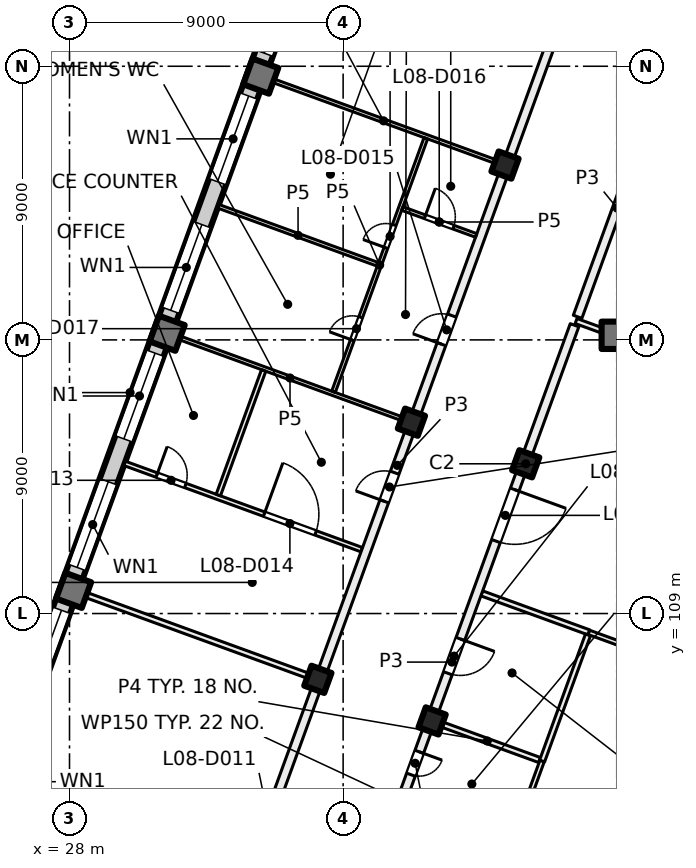
"""IFC4 building model, lengths in metres.
Left out: names, types, materials, properties, quantities, classifications, styles, units other than length and angle.
Written with IfcOpenShell. Run it as: python <this file> out.ifc"""

import sys

from ifc_helpers import new_model, si_unit, direction, frame, frame_2d, origin, origin_2d, place, context, subcontext, project, spatial, rectangle, extrude, element, fill, save


model = new_model("IFC4")
c1 = context("Model", 3, precision=1e-05, world=origin(), true_north=direction((0.0, 1.0)))
c2 = subcontext(c1, "Body", "Model", "MODEL_VIEW")
j1 = project(units=[si_unit("LENGTHUNIT", "METRE"), si_unit("PLANEANGLEUNIT", "RADIAN")], contexts=[c1])
p1 = place(None, origin())
s1 = spatial("IfcSite", under=j1, at=p1, CompositionType="ELEMENT")
p2 = place(p1, origin())
s2 = spatial("IfcBuilding", under=s1, at=p2, CompositionType="ELEMENT")
p3 = place(p2, frame((0.0, 0.0, 39.5)))
s3 = spatial("IfcBuildingStorey", under=s2, at=p3, CompositionType="ELEMENT", Elevation=39.5)
p4 = place(p3, frame((45.952, 118.152, 0.0), z_axis=(0.0, 0.0, 1.0), x_axis=(1.0, 0.0, 0.0)))
e1 = element("IfcColumn", 1, at=p4, inside=s3, PredefinedType="COLUMN", context=c2, shape_type="SweptSolid", body=[
    extrude(rectangle(XDim=0.9, YDim=0.9, at=origin_2d()), origin(), (0.0, 0.0, 1.0), 4.0),
])
for number, where, z_axis, x_axis in (
    (2, (43.006, 113.925, 0.0), (0.0, 0.0, 1.0), (-0.342, -0.94, 0.0)),
    (3, (39.927, 105.468, 0.0), (0.0, 0.0, 1.0), (-0.342, -0.94, 0.0)),
    (4, (42.325, 123.751, 0.0), (0.0, 0.0, 1.0), (-0.342, -0.94, 0.0)),
    (5, (39.247, 115.293, 0.0), (0.0, 0.0, 1.0), (-0.342, -0.94, 0.0)),
    (6, (36.169, 106.836, 0.0), (0.0, 0.0, 1.0), (-0.342, -0.94, 0.0)),
):
    element("IfcColumn", number, at=place(p3, frame(where, z_axis=z_axis, x_axis=x_axis)), inside=s3, PredefinedType="COLUMN", context=c2, shape_type="SweptSolid", body=[
        extrude(rectangle(XDim=0.7, YDim=0.7, at=origin_2d()), origin(), (0.0, 0.0, 1.0), 4.0),
    ])
for number, where, z_axis, x_axis in (
    (7, (34.291, 126.675, 0.0), (0.0, 0.0, 1.0), (-0.342, -0.94, 0.0)),
    (8, (31.212, 118.218, 0.0), (0.0, 0.0, 1.0), (-0.342, -0.94, 0.0)),
    (9, (28.134, 109.76, 0.0), (0.0, 0.0, 1.0), (-0.342, -0.94, 0.0)),
):
    element("IfcColumn", number, at=place(p3, frame(where, z_axis=z_axis, x_axis=x_axis)), inside=s3, PredefinedType="COLUMN", context=c2, shape_type="SweptSolid", body=[
        extrude(rectangle(XDim=0.9, YDim=0.9, at=origin_2d()), origin(), (0.0, 0.0, 1.0), 4.0),
    ])
p5 = place(p3, frame((52.212, 113.783, 0.0), z_axis=(0.0, 0.0, 1.0), x_axis=(-0.34202521188, -0.939690775968, 0.0)))
e10 = element("IfcWall", 10, at=p5, inside=s3, PredefinedType="SOLIDWALL", context=c2, shape_type="SweptSolid", body=[
    extrude(rectangle(XDim=21.745, YDim=0.6, at=frame_2d((10.873, 0.0))), origin(), (0.0, 0.0, 1.0), 3.625),
])
p6 = place(p5, frame((3.765, 0.0, 0.9)))
e11 = element("IfcOpeningElement", 11, at=p6, cuts=e10, PredefinedType="OPENING", context=c2, shape_type="SweptSolid", body=[
    extrude(rectangle(XDim=3.0, YDim=2.4, at=frame_2d((1.5, 1.2))), frame((0.0, 0.31, 0.0), z_axis=(0.0, -1.0, 0.0), x_axis=(1.0, 0.0, 0.0)), (0.0, 0.0, 1.0), 0.62),
])
p7 = place(p5, frame((8.265, 0.0, 0.9)))
e12 = element("IfcOpeningElement", 12, at=p7, cuts=e10, PredefinedType="OPENING", context=c2, shape_type="SweptSolid", body=[
    extrude(rectangle(XDim=3.0, YDim=2.4, at=frame_2d((1.5, 1.2))), frame((0.0, 0.31, 0.0), z_axis=(0.0, -1.0, 0.0), x_axis=(1.0, 0.0, 0.0)), (0.0, 0.0, 1.0), 0.62),
])
p8 = place(p5, frame((12.765, 0.0, 0.9)))
e13 = element("IfcOpeningElement", 13, at=p8, cuts=e10, PredefinedType="OPENING", context=c2, shape_type="SweptSolid", body=[
    extrude(rectangle(XDim=3.0, YDim=2.4, at=frame_2d((1.5, 1.2))), frame((0.0, 0.31, 0.0), z_axis=(0.0, -1.0, 0.0), x_axis=(1.0, 0.0, 0.0)), (0.0, 0.0, 1.0), 0.62),
])
p9 = place(p5, frame((17.265, 0.0, 0.9)))
e14 = element("IfcOpeningElement", 14, at=p9, cuts=e10, PredefinedType="OPENING", context=c2, shape_type="SweptSolid", body=[
    extrude(rectangle(XDim=3.0, YDim=2.4, at=frame_2d((1.5, 1.2))), frame((0.0, 0.31, 0.0), z_axis=(0.0, -1.0, 0.0), x_axis=(1.0, 0.0, 0.0)), (0.0, 0.0, 1.0), 0.62),
])
p10 = place(p3, frame((24.666, 100.669, 0.0), z_axis=(0.0, 0.0, 1.0), x_axis=(0.34201964167, 0.939692803373, 0.0)))
e15 = element("IfcWall", 15, at=p10, inside=s3, PredefinedType="SOLIDWALL", context=c2, shape_type="SweptSolid", body=[
    extrude(rectangle(XDim=32.884, YDim=0.6, at=frame_2d((16.442, 0.0))), origin(), (0.0, 0.0, 1.0), 3.625),
])
p11 = place(p10, frame((1.48, 0.0, 0.9)))
e16 = element("IfcOpeningElement", 16, at=p11, cuts=e15, PredefinedType="OPENING", context=c2, shape_type="SweptSolid", body=[
    extrude(rectangle(XDim=3.0, YDim=2.4, at=frame_2d((1.5, 1.2))), frame((0.0, 0.31, 0.0), z_axis=(0.0, -1.0, 0.0), x_axis=(1.0, 0.0, 0.0)), (0.0, 0.0, 1.0), 0.62),
])
p12 = place(p10, frame((5.98, 0.0, 0.9)))
e17 = element("IfcOpeningElement", 17, at=p12, cuts=e15, PredefinedType="OPENING", context=c2, shape_type="SweptSolid", body=[
    extrude(rectangle(XDim=3.0, YDim=2.4, at=frame_2d((1.5, 1.2))), frame((0.0, 0.31, 0.0), z_axis=(0.0, -1.0, 0.0), x_axis=(1.0, 0.0, 0.0)), (0.0, 0.0, 1.0), 0.62),
])
p13 = place(p10, frame((10.48, 0.0, 0.9)))
e18 = element("IfcOpeningElement", 18, at=p13, cuts=e15, PredefinedType="OPENING", context=c2, shape_type="SweptSolid", body=[
    extrude(rectangle(XDim=3.0, YDim=2.4, at=frame_2d((1.5, 1.2))), frame((0.0, 0.31, 0.0), z_axis=(0.0, -1.0, 0.0), x_axis=(1.0, 0.0, 0.0)), (0.0, 0.0, 1.0), 0.62),
])
p14 = place(p10, frame((14.98, 0.0, 0.9)))
e19 = element("IfcOpeningElement", 19, at=p14, cuts=e15, PredefinedType="OPENING", context=c2, shape_type="SweptSolid", body=[
    extrude(rectangle(XDim=3.0, YDim=2.4, at=frame_2d((1.5, 1.2))), frame((0.0, 0.31, 0.0), z_axis=(0.0, -1.0, 0.0), x_axis=(1.0, 0.0, 0.0)), (0.0, 0.0, 1.0), 0.62),
])
p15 = place(p10, frame((19.48, 0.0, 0.9)))
e20 = element("IfcOpeningElement", 20, at=p15, cuts=e15, PredefinedType="OPENING", context=c2, shape_type="SweptSolid", body=[
    extrude(rectangle(XDim=3.0, YDim=2.4, at=frame_2d((1.5, 1.2))), frame((0.0, 0.31, 0.0), z_axis=(0.0, -1.0, 0.0), x_axis=(1.0, 0.0, 0.0)), (0.0, 0.0, 1.0), 0.62),
])
p16 = place(p10, frame((23.98, 0.0, 0.9)))
e21 = element("IfcOpeningElement", 21, at=p16, cuts=e15, PredefinedType="OPENING", context=c2, shape_type="SweptSolid", body=[
    extrude(rectangle(XDim=3.0, YDim=2.4, at=frame_2d((1.5, 1.2))), frame((0.0, 0.31, 0.0), z_axis=(0.0, -1.0, 0.0), x_axis=(1.0, 0.0, 0.0)), (0.0, 0.0, 1.0), 0.62),
])
p17 = place(p10, frame((28.48, 0.0, 0.9)))
e22 = element("IfcOpeningElement", 22, at=p17, cuts=e15, PredefinedType="OPENING", context=c2, shape_type="SweptSolid", body=[
    extrude(rectangle(XDim=3.0, YDim=2.4, at=frame_2d((1.5, 1.2))), frame((0.0, 0.31, 0.0), z_axis=(0.0, -1.0, 0.0), x_axis=(1.0, 0.0, 0.0)), (0.0, 0.0, 1.0), 0.62),
])
p18 = place(p3, frame((28.275, 109.709, 0.0), z_axis=(0.0, 0.0, 1.0), x_axis=(0.939697205528, -0.342007546586, 0.0)))
e23 = element("IfcWall", 23, at=p18, inside=s3, PredefinedType="PARTITIONING", context=c2, shape_type="SweptSolid", body=[
    extrude(rectangle(XDim=8.301, YDim=0.175, at=frame_2d((4.15, 0.0))), origin(), (0.0, 0.0, 1.0), 3.625),
])
p19 = place(p3, frame((29.814, 113.938, 0.0), z_axis=(0.0, 0.0, 1.0), x_axis=(0.939697205528, -0.342007546586, 0.0)))
e24 = element("IfcWall", 24, at=p19, inside=s3, PredefinedType="PARTITIONING", context=c2, shape_type="SweptSolid", body=[
    extrude(rectangle(XDim=8.301, YDim=0.15, at=frame_2d((4.15, 0.0))), origin(), (0.0, 0.0, 1.0), 3.625),
])
p20 = place(p19, frame((1.125, 0.0, 0.0)))
e25 = element("IfcOpeningElement", 25, at=p20, cuts=e24, PredefinedType="OPENING", context=c2, shape_type="SweptSolid", body=[
    extrude(rectangle(XDim=1.0, YDim=2.1, at=frame_2d((0.5, 1.05))), frame((0.0, 0.085, 0.0), z_axis=(0.0, -1.0, 0.0), x_axis=(1.0, 0.0, 0.0)), (0.0, 0.0, 1.0), 0.17),
])
p21 = place(p19, frame((4.884, 0.0, 0.0)))
e26 = element("IfcOpeningElement", 26, at=p21, cuts=e24, PredefinedType="OPENING", context=c2, shape_type="SweptSolid", body=[
    extrude(rectangle(XDim=1.8, YDim=2.1, at=frame_2d((0.9, 1.05))), frame((0.0, 0.085, 0.0), z_axis=(0.0, -1.0, 0.0), x_axis=(1.0, 0.0, 0.0)), (0.0, 0.0, 1.0), 0.17),
])
p22 = place(p3, frame((31.353, 118.166, 0.0), z_axis=(0.0, 0.0, 1.0), x_axis=(0.939687752599, -0.342033518263, 0.0)))
e27 = element("IfcWall", 27, at=p22, inside=s3, PredefinedType="PARTITIONING", context=c2, shape_type="SweptSolid", body=[
    extrude(rectangle(XDim=8.301, YDim=0.125, at=frame_2d((4.15, 0.0))), origin(), (0.0, 0.0, 1.0), 3.625),
])
p23 = place(p3, frame((32.881, 97.657, 0.0), z_axis=(0.0, 0.0, 1.0), x_axis=(0.342017360004, 0.939693633828, 0.0)))
e28 = element("IfcWall", 28, at=p23, inside=s3, PredefinedType="PARTITIONING", context=c2, shape_type="SweptSolid", body=[
    extrude(rectangle(XDim=34.516, YDim=0.3, at=frame_2d((17.258, 0.0))), origin(), (0.0, 0.0, 1.0), 3.625),
])
p24 = place(p23, frame((4.275, 0.0, 0.0)))
e29 = element("IfcOpeningElement", 29, at=p24, cuts=e28, PredefinedType="OPENING", context=c2, shape_type="SweptSolid", body=[
    extrude(rectangle(XDim=1.2, YDim=2.1, at=frame_2d((0.6, 1.05))), frame((0.0, 0.16, 0.0), z_axis=(0.0, -1.0, 0.0), x_axis=(1.0, 0.0, 0.0)), (0.0, 0.0, 1.0), 0.32),
])
p25 = place(p23, frame((16.0, 0.0, 0.0)))
e30 = element("IfcOpeningElement", 30, at=p25, cuts=e28, PredefinedType="OPENING", context=c2, shape_type="SweptSolid", body=[
    extrude(rectangle(XDim=1.0, YDim=2.1, at=frame_2d((0.5, 1.05))), frame((0.0, 0.16, 0.0), z_axis=(0.0, -1.0, 0.0), x_axis=(1.0, 0.0, 0.0)), (0.0, 0.0, 1.0), 0.32),
])
p26 = place(p23, frame((21.5, 0.0, 0.0)))
e31 = element("IfcOpeningElement", 31, at=p26, cuts=e28, PredefinedType="OPENING", context=c2, shape_type="SweptSolid", body=[
    extrude(rectangle(XDim=1.0, YDim=2.1, at=frame_2d((0.5, 1.05))), frame((0.0, 0.16, 0.0), z_axis=(0.0, -1.0, 0.0), x_axis=(1.0, 0.0, 0.0)), (0.0, 0.0, 1.0), 0.32),
])
p27 = place(p3, frame((34.386, 116.996, 0.0), z_axis=(0.0, 0.0, 1.0), x_axis=(-0.341945230853, -0.939719883315, 0.0)))
e32 = element("IfcWall", 32, at=p27, inside=s3, PredefinedType="PARTITIONING", context=c2, shape_type="SweptSolid", body=[
    extrude(rectangle(XDim=4.363, YDim=0.15, at=frame_2d((2.182, 0.0))), origin(), (0.0, 0.0, 1.0), 3.625),
])
p28 = place(p3, frame((34.431, 126.624, 0.0), z_axis=(0.0, 0.0, 1.0), x_axis=(0.939687752599, -0.342033518263, 0.0)))
e33 = element("IfcWall", 33, at=p28, inside=s3, PredefinedType="PARTITIONING", context=c2, shape_type="SweptSolid", body=[
    extrude(rectangle(XDim=8.301, YDim=0.125, at=frame_2d((4.15, 0.0))), origin(), (0.0, 0.0, 1.0), 3.625),
])
p29 = place(p3, frame((36.684, 116.293, 0.0), z_axis=(0.0, 0.0, 1.0), x_axis=(0.342089829483, 0.939667254173, 0.0)))
e34 = element("IfcWall", 34, at=p29, inside=s3, PredefinedType="PARTITIONING", context=c2, shape_type="SweptSolid", body=[
    extrude(rectangle(XDim=8.875, YDim=0.125, at=frame_2d((4.437, 0.0))), origin(), (0.0, 0.0, 1.0), 3.625),
])
p30 = place(p29, frame((1.809, 0.0, 0.0)))
e35 = element("IfcOpeningElement", 35, at=p30, cuts=e34, PredefinedType="OPENING", context=c2, shape_type="SweptSolid", body=[
    extrude(rectangle(XDim=0.8, YDim=2.1, at=frame_2d((0.4, 1.05))), frame((0.0, 0.073, 0.0), z_axis=(0.0, -1.0, 0.0), x_axis=(1.0, 0.0, 0.0)), (0.0, 0.0, 1.0), 0.145),
])
p31 = place(p29, frame((5.039, 0.0, 0.0)))
e36 = element("IfcOpeningElement", 36, at=p31, cuts=e34, PredefinedType="OPENING", context=c2, shape_type="SweptSolid", body=[
    extrude(rectangle(XDim=0.8, YDim=2.1, at=frame_2d((0.4, 1.05))), frame((0.0, 0.073, 0.0), z_axis=(0.0, -1.0, 0.0), x_axis=(1.0, 0.0, 0.0)), (0.0, 0.0, 1.0), 0.145),
])
p32 = place(p3, frame((38.143, 120.484, 0.0), z_axis=(0.0, 0.0, 1.0), x_axis=(-0.939696437289, 0.342009657388, 0.0)))
e37 = element("IfcWall", 37, at=p32, inside=s3, PredefinedType="PARTITIONING", context=c2, shape_type="SweptSolid", body=[
    extrude(rectangle(XDim=5.588, YDim=0.125, at=frame_2d((2.794, 0.0))), origin(), (0.0, 0.0, 1.0), 3.625),
])
p33 = place(p3, frame((41.561, 109.663, 0.0), z_axis=(0.0, 0.0, 1.0), x_axis=(0.939610777088, -0.34224492338, 0.0)))
e38 = element("IfcWall", 38, at=p33, inside=s3, PredefinedType="PARTITIONING", context=c2, shape_type="SweptSolid", body=[
    extrude(rectangle(XDim=3.749, YDim=0.175, at=frame_2d((1.875, 0.0))), origin(), (0.0, 0.0, 1.0), 3.625),
])
p34 = place(p3, frame((38.945, 122.321, 0.0), z_axis=(0.0, 0.0, 1.0), x_axis=(0.939542462288, -0.342432418966, 0.0)))
e39 = element("IfcWall", 39, at=p34, inside=s3, PredefinedType="PARTITIONING", context=c2, shape_type="SweptSolid", body=[
    extrude(rectangle(XDim=2.587, YDim=0.125, at=frame_2d((1.294, 0.0))), origin(), (0.0, 0.0, 1.0), 3.625),
])
p35 = place(p34, frame((0.794, 0.0, 0.0)))
e40 = element("IfcOpeningElement", 40, at=p35, cuts=e39, PredefinedType="OPENING", context=c2, shape_type="SweptSolid", body=[
    extrude(rectangle(XDim=1.0, YDim=2.1, at=frame_2d((0.5, 1.05))), frame((0.0, 0.073, 0.0), z_axis=(0.0, -1.0, 0.0), x_axis=(1.0, 0.0, 0.0)), (0.0, 0.0, 1.0), 0.145),
])
p36 = place(p3, frame((43.463, 104.181, 0.0), z_axis=(0.0, 0.0, 1.0), x_axis=(-0.939655178262, 0.342122998299, 0.0)))
e41 = element("IfcWall", 41, at=p36, inside=s3, PredefinedType="PARTITIONING", context=c2, shape_type="SweptSolid", body=[
    extrude(rectangle(XDim=3.663, YDim=0.175, at=frame_2d((1.832, 0.0))), origin(), (0.0, 0.0, 1.0), 3.625),
])
p37 = place(p3, frame((43.545, 104.151, 0.0), z_axis=(0.0, 0.0, 1.0), x_axis=(-0.341877092744, -0.93974467461, 0.0)))
e42 = element("IfcWall", 42, at=p37, inside=s3, PredefinedType="PARTITIONING", context=c2, shape_type="SweptSolid", body=[
    extrude(rectangle(XDim=2.925, YDim=0.15, at=frame_2d((1.462, 0.0))), origin(), (0.0, 0.0, 1.0), 3.625),
])
p38 = place(p3, frame((52.965, 115.598, 0.0), z_axis=(0.0, 0.0, 1.0), x_axis=(-0.939650555598, 0.342135694374, 0.0)))
e43 = element("IfcWall", 43, at=p38, inside=s3, PredefinedType="PARTITIONING", context=c2, shape_type="SweptSolid", body=[
    extrude(rectangle(XDim=8.836, YDim=0.175, at=frame_2d((4.418, 0.0))), origin(), (0.0, 0.0, 1.0), 3.625),
])
p39 = place(p38, frame((3.818, 0.0, 0.0)))
e44 = element("IfcOpeningElement", 44, at=p39, cuts=e43, PredefinedType="OPENING", context=c2, shape_type="SweptSolid", body=[
    extrude(rectangle(XDim=1.2, YDim=2.1, at=frame_2d((0.6, 1.05))), frame((0.0, 0.097, 0.0), z_axis=(0.0, -1.0, 0.0), x_axis=(1.0, 0.0, 0.0)), (0.0, 0.0, 1.0), 0.195),
])
p40 = place(p3, frame((44.612, 118.483, 0.0), z_axis=(0.0, 0.0, 1.0), x_axis=(-0.342043123066, -0.939684256526, 0.0)))
e45 = element("IfcWall", 45, at=p40, inside=s3, PredefinedType="PARTITIONING", context=c2, shape_type="SweptSolid", body=[
    extrude(rectangle(XDim=23.582, YDim=0.3, at=frame_2d((11.791, 0.0))), origin(), (0.0, 0.0, 1.0), 3.625),
])
p41 = place(p40, frame((14.932, 0.0, 0.0)))
e46 = element("IfcOpeningElement", 46, at=p41, cuts=e45, PredefinedType="OPENING", context=c2, shape_type="SweptSolid", body=[
    extrude(rectangle(XDim=0.8, YDim=2.1, at=frame_2d((0.4, 1.05))), frame((0.0, 0.16, 0.0), z_axis=(0.0, -1.0, 0.0), x_axis=(1.0, 0.0, 0.0)), (0.0, 0.0, 1.0), 0.32),
])
p42 = place(p40, frame((10.982, 0.0, 0.0)))
e47 = element("IfcOpeningElement", 47, at=p42, cuts=e45, PredefinedType="OPENING", context=c2, shape_type="SweptSolid", body=[
    extrude(rectangle(XDim=1.2, YDim=2.1, at=frame_2d((0.6, 1.05))), frame((0.0, 0.16, 0.0), z_axis=(0.0, -1.0, 0.0), x_axis=(1.0, 0.0, 0.0)), (0.0, 0.0, 1.0), 0.32),
])
p43 = place(p40, frame((19.307, 0.0, 0.0)))
e48 = element("IfcOpeningElement", 48, at=p43, cuts=e45, PredefinedType="OPENING", context=c2, shape_type="SweptSolid", body=[
    extrude(rectangle(XDim=1.8, YDim=2.1, at=frame_2d((0.9, 1.05))), frame((0.0, 0.16, 0.0), z_axis=(0.0, -1.0, 0.0), x_axis=(1.0, 0.0, 0.0)), (0.0, 0.0, 1.0), 0.32),
])
p44 = place(p40, frame((5.756, 0.0, 0.0)))
e49 = element("IfcOpeningElement", 49, at=p44, cuts=e45, PredefinedType="OPENING", context=c2, shape_type="SweptSolid", body=[
    extrude(rectangle(XDim=1.8, YDim=2.1, at=frame_2d((0.9, 1.05))), frame((0.0, 0.16, 0.0), z_axis=(0.0, -1.0, 0.0), x_axis=(1.0, 0.0, 0.0)), (0.0, 0.0, 1.0), 0.32),
])
p45 = place(p3, frame((45.054, 108.298, 0.0), z_axis=(0.0, 0.0, 1.0), x_axis=(-0.34193405199, -0.939723951004, 0.0)))
e50 = element("IfcWall", 50, at=p45, inside=s3, PredefinedType="PARTITIONING", context=c2, shape_type="SweptSolid", body=[
    extrude(rectangle(XDim=4.413, YDim=0.175, at=frame_2d((2.207, 0.0))), origin(), (0.0, 0.0, 1.0), 3.625),
])
p46 = place(p3, frame((45.084, 108.38, 0.0), z_axis=(0.0, 0.0, 1.0), x_axis=(0.93972604571, -0.341928295136, 0.0)))
e51 = element("IfcWall", 51, at=p46, inside=s3, PredefinedType="PARTITIONING", context=c2, shape_type="SweptSolid", body=[
    extrude(rectangle(XDim=4.55, YDim=0.15, at=frame_2d((2.275, 0.0))), origin(), (0.0, 0.0, 1.0), 3.625),
])
p47 = place(p3, frame((47.314, 125.909, 0.0), z_axis=(0.0, 0.0, 1.0), x_axis=(-0.34198522802, -0.939705328183, 0.0)))
e52 = element("IfcWall", 52, at=p47, inside=s3, PredefinedType="PARTITIONING", context=c2, shape_type="SweptSolid", body=[
    extrude(rectangle(XDim=7.609, YDim=0.3, at=frame_2d((3.804, 0.0))), origin(), (0.0, 0.0, 1.0), 3.625),
])
p48 = place(p12, origin())
e53 = element("IfcWindow", 53, at=p48, inside=s3, PartitioningType="SINGLE_PANEL", PredefinedType="WINDOW", context=c2, shape_type="SweptSolid", body=[
    extrude(rectangle(XDim=3.0, YDim=2.4, at=frame_2d((1.5, 1.2))), frame((0.0, 0.03, 0.0), z_axis=(0.0, -1.0, 0.0), x_axis=(1.0, 0.0, 0.0)), (0.0, 0.0, 1.0), 0.06),
])
fill(e17, e53)
p49 = place(p13, origin())
e54 = element("IfcWindow", 54, at=p49, inside=s3, PartitioningType="SINGLE_PANEL", PredefinedType="WINDOW", context=c2, shape_type="SweptSolid", body=[
    extrude(rectangle(XDim=3.0, YDim=2.4, at=frame_2d((1.5, 1.2))), frame((0.0, 0.03, 0.0), z_axis=(0.0, -1.0, 0.0), x_axis=(1.0, 0.0, 0.0)), (0.0, 0.0, 1.0), 0.06),
])
fill(e18, e54)
p50 = place(p14, origin())
e55 = element("IfcWindow", 55, at=p50, inside=s3, PartitioningType="SINGLE_PANEL", PredefinedType="WINDOW", context=c2, shape_type="SweptSolid", body=[
    extrude(rectangle(XDim=3.0, YDim=2.4, at=frame_2d((1.5, 1.2))), frame((0.0, 0.03, 0.0), z_axis=(0.0, -1.0, 0.0), x_axis=(1.0, 0.0, 0.0)), (0.0, 0.0, 1.0), 0.06),
])
fill(e19, e55)
p51 = place(p15, origin())
e56 = element("IfcWindow", 56, at=p51, inside=s3, PartitioningType="SINGLE_PANEL", PredefinedType="WINDOW", context=c2, shape_type="SweptSolid", body=[
    extrude(rectangle(XDim=3.0, YDim=2.4, at=frame_2d((1.5, 1.2))), frame((0.0, 0.03, 0.0), z_axis=(0.0, -1.0, 0.0), x_axis=(1.0, 0.0, 0.0)), (0.0, 0.0, 1.0), 0.06),
])
fill(e20, e56)
p52 = place(p16, origin())
e57 = element("IfcWindow", 57, at=p52, inside=s3, PartitioningType="SINGLE_PANEL", PredefinedType="WINDOW", context=c2, shape_type="SweptSolid", body=[
    extrude(rectangle(XDim=3.0, YDim=2.4, at=frame_2d((1.5, 1.2))), frame((0.0, 0.03, 0.0), z_axis=(0.0, -1.0, 0.0), x_axis=(1.0, 0.0, 0.0)), (0.0, 0.0, 1.0), 0.06),
])
fill(e21, e57)
p53 = place(p17, origin())
e58 = element("IfcWindow", 58, at=p53, inside=s3, PartitioningType="SINGLE_PANEL", PredefinedType="WINDOW", context=c2, shape_type="SweptSolid", body=[
    extrude(rectangle(XDim=3.0, YDim=2.4, at=frame_2d((1.5, 1.2))), frame((0.0, 0.03, 0.0), z_axis=(0.0, -1.0, 0.0), x_axis=(1.0, 0.0, 0.0)), (0.0, 0.0, 1.0), 0.06),
])
fill(e22, e58)
p54 = place(p25, origin())
e59 = element("IfcDoor", 59, at=p54, inside=s3, OperationType="SINGLE_SWING_LEFT", PredefinedType="DOOR", context=c2, shape_type="SweptSolid", body=[
    extrude(rectangle(XDim=1.0, YDim=2.1, at=frame_2d((0.5, 1.05))), frame((0.0, 0.025, 0.0), z_axis=(0.0, -1.0, 0.0), x_axis=(1.0, 0.0, 0.0)), (0.0, 0.0, 1.0), 0.05),
])
fill(e30, e59)
p55 = place(p20, origin())
e60 = element("IfcDoor", 60, at=p55, inside=s3, OperationType="SINGLE_SWING_RIGHT", PredefinedType="DOOR", context=c2, shape_type="SweptSolid", body=[
    extrude(rectangle(XDim=1.0, YDim=2.1, at=frame_2d((0.5, 1.05))), frame((0.0, 0.025, 0.0), z_axis=(0.0, -1.0, 0.0), x_axis=(1.0, 0.0, 0.0)), (0.0, 0.0, 1.0), 0.05),
])
fill(e25, e60)
p56 = place(p21, origin())
e61 = element("IfcDoor", 61, at=p56, inside=s3, OperationType="DOUBLE_DOOR_SINGLE_SWING", PredefinedType="DOOR", context=c2, shape_type="SweptSolid", body=[
    extrude(rectangle(XDim=1.8, YDim=2.1, at=frame_2d((0.9, 1.05))), frame((0.0, 0.025, 0.0), z_axis=(0.0, -1.0, 0.0), x_axis=(1.0, 0.0, 0.0)), (0.0, 0.0, 1.0), 0.05),
])
fill(e26, e61)
p57 = place(p26, origin())
e62 = element("IfcDoor", 62, at=p57, inside=s3, OperationType="SINGLE_SWING_LEFT", PredefinedType="DOOR", context=c2, shape_type="SweptSolid", body=[
    extrude(rectangle(XDim=1.0, YDim=2.1, at=frame_2d((0.5, 1.05))), frame((0.0, 0.025, 0.0), z_axis=(0.0, -1.0, 0.0), x_axis=(1.0, 0.0, 0.0)), (0.0, 0.0, 1.0), 0.05),
])
fill(e31, e62)
p58 = place(p35, origin())
e63 = element("IfcDoor", 63, at=p58, inside=s3, OperationType="SINGLE_SWING_LEFT", PredefinedType="DOOR", context=c2, shape_type="SweptSolid", body=[
    extrude(rectangle(XDim=1.0, YDim=2.1, at=frame_2d((0.5, 1.05))), frame((0.0, 0.025, 0.0), z_axis=(0.0, -1.0, 0.0), x_axis=(1.0, 0.0, 0.0)), (0.0, 0.0, 1.0), 0.05),
])
fill(e40, e63)
p59 = place(p30, origin())
e64 = element("IfcDoor", 64, at=p59, inside=s3, OperationType="SINGLE_SWING_RIGHT", PredefinedType="DOOR", context=c2, shape_type="SweptSolid", body=[
    extrude(rectangle(XDim=0.8, YDim=2.1, at=frame_2d((0.4, 1.05))), frame((0.0, 0.025, 0.0), z_axis=(0.0, -1.0, 0.0), x_axis=(1.0, 0.0, 0.0)), (0.0, 0.0, 1.0), 0.05),
])
fill(e35, e64)
p60 = place(p31, origin())
e65 = element("IfcDoor", 65, at=p60, inside=s3, OperationType="SINGLE_SWING_LEFT", PredefinedType="DOOR", context=c2, shape_type="SweptSolid", body=[
    extrude(rectangle(XDim=0.8, YDim=2.1, at=frame_2d((0.4, 1.05))), frame((0.0, 0.025, 0.0), z_axis=(0.0, -1.0, 0.0), x_axis=(1.0, 0.0, 0.0)), (0.0, 0.0, 1.0), 0.05),
])
fill(e36, e65)
p61 = place(p41, origin())
e66 = element("IfcDoor", 66, at=p61, inside=s3, OperationType="SINGLE_SWING_LEFT", PredefinedType="DOOR", context=c2, shape_type="SweptSolid", body=[
    extrude(rectangle(XDim=0.8, YDim=2.1, at=frame_2d((0.4, 1.05))), frame((0.0, 0.025, 0.0), z_axis=(0.0, -1.0, 0.0), x_axis=(1.0, 0.0, 0.0)), (0.0, 0.0, 1.0), 0.05),
])
fill(e46, e66)
p62 = place(p42, origin())
e67 = element("IfcDoor", 67, at=p62, inside=s3, OperationType="DOUBLE_DOOR_SINGLE_SWING", PredefinedType="DOOR", context=c2, shape_type="SweptSolid", body=[
    extrude(rectangle(XDim=1.2, YDim=2.1, at=frame_2d((0.6, 1.05))), frame((0.0, 0.025, 0.0), z_axis=(0.0, -1.0, 0.0), x_axis=(1.0, 0.0, 0.0)), (0.0, 0.0, 1.0), 0.05),
])
fill(e47, e67)
p63 = place(p44, origin())
e68 = element("IfcDoor", 68, at=p63, inside=s3, OperationType="DOUBLE_DOOR_SINGLE_SWING", PredefinedType="DOOR", context=c2, shape_type="SweptSolid", body=[
    extrude(rectangle(XDim=1.8, YDim=2.1, at=frame_2d((0.9, 1.05))), frame((0.0, 0.025, 0.0), z_axis=(0.0, -1.0, 0.0), x_axis=(1.0, 0.0, 0.0)), (0.0, 0.0, 1.0), 0.05),
])
fill(e49, e68)
save(model, sys.argv[1])
